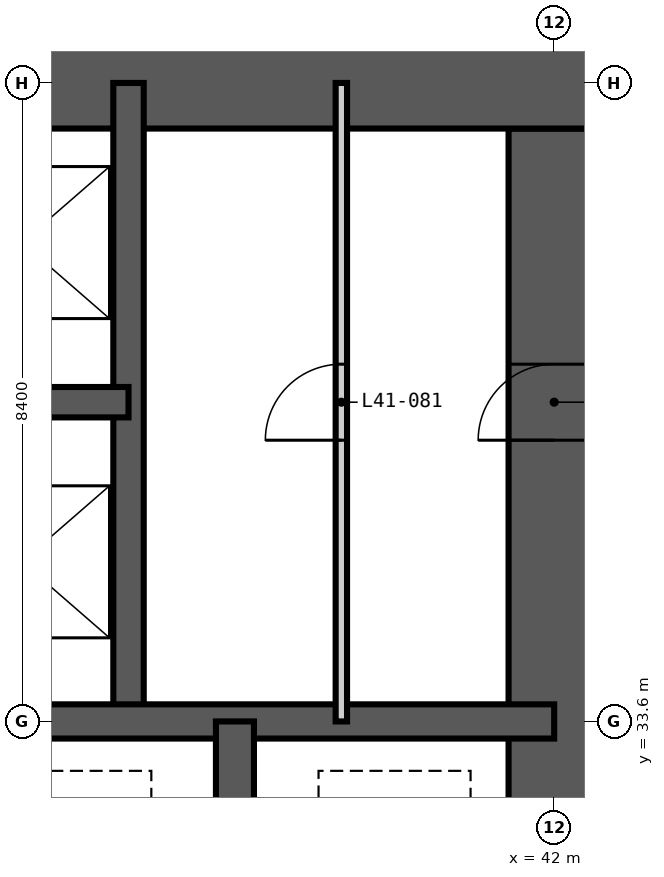
"""IFC4 building model, lengths in metres.
Left out: names, types, materials, properties, quantities, classifications, styles, units other than length and angle.
Written with IfcOpenShell. Run it as: python <this file> out.ifc"""

import sys

from ifc_helpers import new_model, si_unit, direction, frame, frame_2d, origin, place, context, subcontext, project, spatial, rectangle, extrude, element, fill, save


model = new_model("IFC4")
c1 = context("Model", 3, precision=1e-05, world=origin(), true_north=direction((0.0, 1.0)))
c2 = subcontext(c1, "Body", "Model", "MODEL_VIEW")
j1 = project(units=[si_unit("LENGTHUNIT", "METRE"), si_unit("PLANEANGLEUNIT", "RADIAN")], contexts=[c1])
p1 = place(None, origin())
s1 = spatial("IfcSite", under=j1, at=p1, CompositionType="ELEMENT")
p2 = place(p1, origin())
s2 = spatial("IfcBuilding", under=s1, at=p2, CompositionType="ELEMENT")
p3 = place(p2, frame((0.0, 0.0, 162.6)))
s3 = spatial("IfcBuildingStorey", under=s2, at=p3, CompositionType="ELEMENT", Elevation=162.6)
p4 = place(p3, frame((42.0, 17.4, -0.35), z_axis=(0.0, 0.0, 1.0), x_axis=(0.0, 1.0, 0.0)))
e1 = element("IfcWall", 1, at=p4, inside=s3, PredefinedType="SHEAR", context=c2, shape_type="SweptSolid", body=[
    extrude(rectangle(XDim=24.0, YDim=1.2, at=frame_2d((12.0, 0.0))), origin(), (0.0, 0.0, 1.0), 3.6),
])
p5 = place(p4, frame((0.2, 0.0, 0.35)))
e2 = element("IfcOpeningElement", 2, at=p5, cuts=e1, PredefinedType="OPENING", context=c2, shape_type="SweptSolid", body=[
    extrude(rectangle(XDim=1.2, YDim=2.2, at=frame_2d((0.6, 1.1))), frame((0.0, 0.61, 0.0), z_axis=(0.0, -1.0, 0.0), x_axis=(1.0, 0.0, 0.0)), (0.0, 0.0, 1.0), 1.22),
])
p6 = place(p4, frame((11.5, 0.0, 0.35)))
e3 = element("IfcOpeningElement", 3, at=p6, cuts=e1, PredefinedType="OPENING", context=c2, shape_type="SweptSolid", body=[
    extrude(rectangle(XDim=1.0, YDim=2.1, at=frame_2d((0.5, 1.05))), frame((0.0, 0.61, 0.0), z_axis=(0.0, -1.0, 0.0), x_axis=(1.0, 0.0, 0.0)), (0.0, 0.0, 1.0), 1.22),
])
p7 = place(p4, frame((19.9, 0.0, 0.35)))
e4 = element("IfcOpeningElement", 4, at=p7, cuts=e1, PredefinedType="OPENING", context=c2, shape_type="SweptSolid", body=[
    extrude(rectangle(XDim=1.0, YDim=2.1, at=frame_2d((0.5, 1.05))), frame((0.0, 0.61, 0.0), z_axis=(0.0, -1.0, 0.0), x_axis=(1.0, 0.0, 0.0)), (0.0, 0.0, 1.0), 1.22),
])
p8 = place(p3, frame((42.6, 42.0, -0.35), z_axis=(0.0, 0.0, 1.0), x_axis=(-1.0, 0.0, 0.0)))
e5 = element("IfcWall", 5, at=p8, inside=s3, PredefinedType="SHEAR", context=c2, shape_type="SweptSolid", body=[
    extrude(rectangle(XDim=26.4, YDim=1.2, at=frame_2d((13.2, 0.0))), origin(), (0.0, 0.0, 1.0), 3.6),
])
p9 = place(p8, frame((21.1, 0.0, 0.35)))
e6 = element("IfcOpeningElement", 6, at=p9, cuts=e5, PredefinedType="OPENING", context=c2, shape_type="SweptSolid", body=[
    extrude(rectangle(XDim=1.0, YDim=2.1, at=frame_2d((0.5, 1.05))), frame((0.0, 0.61, 0.0), z_axis=(0.0, -1.0, 0.0), x_axis=(1.0, 0.0, 0.0)), (0.0, 0.0, 1.0), 1.22),
])
p10 = place(p8, frame((10.5, 0.0, 0.35)))
e7 = element("IfcOpeningElement", 7, at=p10, cuts=e5, PredefinedType="OPENING", context=c2, shape_type="SweptSolid", body=[
    extrude(rectangle(XDim=1.2, YDim=2.2, at=frame_2d((0.6, 1.1))), frame((0.0, 0.61, 0.0), z_axis=(0.0, -1.0, 0.0), x_axis=(1.0, 0.0, 0.0)), (0.0, 0.0, 1.0), 1.22),
])
p11 = place(p3, frame((36.4, 33.6, -0.35), z_axis=(0.0, 0.0, 1.0), x_axis=(0.0, 1.0, 0.0)))
e8 = element("IfcWall", 8, at=p11, inside=s3, PredefinedType="SHEAR", context=c2, shape_type="SweptSolid", body=[
    extrude(rectangle(XDim=8.4, YDim=0.4, at=frame_2d((4.2, 0.0))), origin(), (0.0, 0.0, 1.0), 3.6),
])
p12 = place(p3, frame((33.6, 37.8, -0.35), z_axis=(0.0, 0.0, 1.0), x_axis=(1.0, 0.0, 0.0)))
e9 = element("IfcWall", 9, at=p12, inside=s3, PredefinedType="SHEAR", context=c2, shape_type="SweptSolid", body=[
    extrude(rectangle(XDim=2.8, YDim=0.4, at=frame_2d((1.4, 0.0))), origin(), (0.0, 0.0, 1.0), 3.6),
])
p13 = place(p3, frame((16.8, 33.6, -0.35), z_axis=(0.0, 0.0, 1.0), x_axis=(1.0, 0.0, 0.0)))
e10 = element("IfcWall", 10, at=p13, inside=s3, PredefinedType="SHEAR", context=c2, shape_type="SweptSolid", body=[
    extrude(rectangle(XDim=25.2, YDim=0.45, at=frame_2d((12.6, 0.0))), origin(), (0.0, 0.0, 1.0), 3.6),
])
p14 = place(p3, frame((37.8, 30.8, -0.35), z_axis=(0.0, 0.0, 1.0), x_axis=(0.0, 1.0, 0.0)))
e11 = element("IfcWall", 11, at=p14, inside=s3, PredefinedType="SHEAR", context=c2, shape_type="SweptSolid", body=[
    extrude(rectangle(XDim=2.8, YDim=0.5, at=frame_2d((1.4, 0.0))), origin(), (0.0, 0.0, 1.0), 3.6),
])
p15 = place(p3, frame((39.2, 33.6, 0.0), z_axis=(0.0, 0.0, 1.0), x_axis=(0.0, 1.0, 0.0)))
e12 = element("IfcWall", 12, at=p15, inside=s3, PredefinedType="PARTITIONING", context=c2, shape_type="SweptSolid", body=[
    extrude(rectangle(XDim=8.4, YDim=0.15, at=frame_2d((4.2, 0.0))), origin(), (0.0, 0.0, 1.0), 3.25),
])
p16 = place(p15, frame((3.7, 0.0, 0.0)))
e13 = element("IfcOpeningElement", 13, at=p16, cuts=e12, PredefinedType="OPENING", context=c2, shape_type="SweptSolid", body=[
    extrude(rectangle(XDim=1.0, YDim=2.1, at=frame_2d((0.5, 1.05))), frame((0.0, 0.085, 0.0), z_axis=(0.0, -1.0, 0.0), x_axis=(1.0, 0.0, 0.0)), (0.0, 0.0, 1.0), 0.17),
])
p17 = place(p7, origin())
e14 = element("IfcDoor", 14, at=p17, inside=s3, OperationType="SINGLE_SWING_LEFT", PredefinedType="DOOR", context=c2, shape_type="SweptSolid", body=[
    extrude(rectangle(XDim=1.0, YDim=2.1, at=frame_2d((0.5, 1.05))), frame((0.0, 0.025, 0.0), z_axis=(0.0, -1.0, 0.0), x_axis=(1.0, 0.0, 0.0)), (0.0, 0.0, 1.0), 0.05),
])
fill(e4, e14)
p18 = place(p16, origin())
e15 = element("IfcDoor", 15, at=p18, inside=s3, OperationType="SINGLE_SWING_LEFT", PredefinedType="DOOR", context=c2, shape_type="SweptSolid", body=[
    extrude(rectangle(XDim=1.0, YDim=2.1, at=frame_2d((0.5, 1.05))), frame((0.0, 0.025, 0.0), z_axis=(0.0, -1.0, 0.0), x_axis=(1.0, 0.0, 0.0)), (0.0, 0.0, 1.0), 0.05),
])
fill(e13, e15)
save(model, sys.argv[1])
